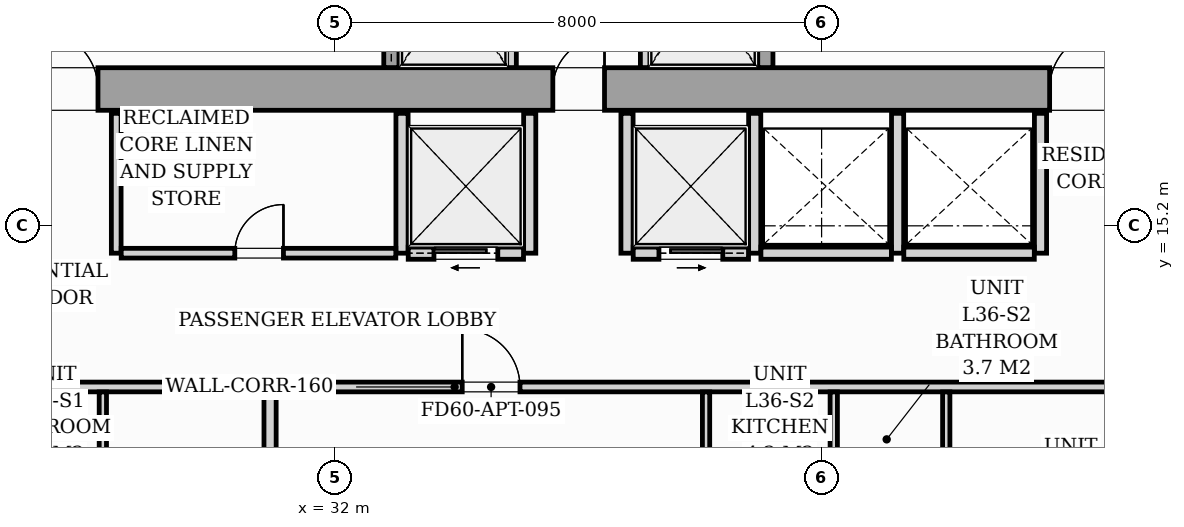
"""IFC4 building model, lengths in metres.
Left out: names, types, materials, properties, quantities, classifications, styles, units other than length and angle.
Written with IfcOpenShell. Run it as: python <this file> out.ifc"""

import sys

from ifc_helpers import new_model, si_unit, direction, frame, frame_2d, origin, origin_2d, place, context, subcontext, project, spatial, rectangle, i_section, extrude, source, transform, mapped, element, fill, save


model = new_model("IFC4")
c1 = context("Model", 3, precision=1e-05, world=origin(), true_north=direction((0.0, 1.0)))
c2 = subcontext(c1, "Body", "Model", "MODEL_VIEW")
j1 = project(units=[si_unit("LENGTHUNIT", "METRE"), si_unit("PLANEANGLEUNIT", "RADIAN")], contexts=[c1])
p1 = place(None, origin())
s1 = spatial("IfcSite", under=j1, at=p1, CompositionType="ELEMENT")
p2 = place(p1, origin())
s2 = spatial("IfcBuilding", under=s1, at=p2, CompositionType="ELEMENT")
p3 = place(p2, frame((0.0, 0.0, 127.8)))
s3 = spatial("IfcBuildingStorey", under=s2, at=p3, CompositionType="ELEMENT", Elevation=127.8)
m1 = source(origin(), c2, "Body", "SweptSolid", [
    extrude(i_section(OverallWidth=0.421, OverallDepth=0.465, WebThickness=0.045, FlangeThickness=0.073, FilletRadius=0.018, at=origin_2d()), origin(), (0.0, 0.0, 1.0), 3.196),
])
for number, where, z_axis, x_axis in (
    (1, (33.12, 17.4, 0.002), (0.0, 0.0, 1.0), (1.0, 0.0, 0.0)),
    (2, (38.88, 17.4, 0.002), (0.0, 0.0, 1.0), (1.0, 0.0, 0.0)),
):
    element("IfcColumn", number, at=place(p3, frame(where, z_axis=z_axis, x_axis=x_axis)), inside=s3, PredefinedType="PILASTER", context=c2, shape_type="MappedRepresentation", body=[
        mapped(m1, transform((0.0, 0.0, 0.0), scale=1.0)),
    ])
p4 = place(p3, frame((26.1, 17.45, 0.0), z_axis=(0.0, 0.0, 1.0), x_axis=(1.0, 0.0, 0.0)))
e3 = element("IfcWall", 3, at=p4, inside=s3, PredefinedType="SHEAR", context=c2, shape_type="SweptSolid", body=[
    extrude(rectangle(XDim=19.8, YDim=0.7, at=frame_2d((9.9, 0.0))), origin(), (0.0, 0.0, 1.0), 3.2),
])
p5 = place(p4, frame((1.05, 0.0, 0.0)))
e4 = element("IfcOpeningElement", 4, at=p5, cuts=e3, PredefinedType="OPENING", context=c2, shape_type="SweptSolid", body=[
    extrude(rectangle(XDim=0.95, YDim=2.06, at=frame_2d((0.475, 1.03))), frame((0.0, 0.36, 0.0), z_axis=(0.0, -1.0, 0.0), x_axis=(1.0, 0.0, 0.0)), (0.0, 0.0, 1.0), 0.72),
])
p6 = place(p4, frame((9.48, 0.0, 0.0)))
e5 = element("IfcOpeningElement", 5, at=p6, cuts=e3, PredefinedType="OPENING", context=c2, shape_type="SweptSolid", body=[
    extrude(rectangle(XDim=0.85, YDim=2.0, at=frame_2d((0.425, 1.0))), frame((0.0, 0.36, 0.0), z_axis=(0.0, -1.0, 0.0), x_axis=(1.0, 0.0, 0.0)), (0.0, 0.0, 1.0), 0.72),
])
p7 = place(p4, frame((17.65, 0.0, 0.0)))
e6 = element("IfcOpeningElement", 6, at=p7, cuts=e3, PredefinedType="OPENING", context=c2, shape_type="SweptSolid", body=[
    extrude(rectangle(XDim=0.95, YDim=2.06, at=frame_2d((0.475, 1.03))), frame((0.0, 0.36, 0.0), z_axis=(0.0, -1.0, 0.0), x_axis=(1.0, 0.0, 0.0)), (0.0, 0.0, 1.0), 0.72),
])
p8 = place(p3, frame((32.925, 17.802, 0.0), z_axis=(0.0, 0.0, 1.0), x_axis=(0.0, 1.0, 0.0)))
e7 = element("IfcWall", 7, at=p8, inside=s3, PredefinedType="SOLIDWALL", context=c2, shape_type="SweptSolid", body=[
    extrude(rectangle(XDim=2.646, YDim=0.25, at=frame_2d((1.323, 0.0))), origin(), (0.0, 0.0, 1.0), 3.2),
])
p9 = place(p8, frame((0.598, 0.0, 0.0)))
e8 = element("IfcOpeningElement", 8, at=p9, cuts=e7, PredefinedType="OPENING", context=c2, shape_type="SweptSolid", body=[
    extrude(rectangle(XDim=1.1, YDim=2.08, at=frame_2d((0.55, 1.04))), frame((0.0, 0.135, 0.0), z_axis=(0.0, -1.0, 0.0), x_axis=(1.0, 0.0, 0.0)), (0.0, 0.0, 1.0), 0.27),
])
for number, where, z_axis, x_axis in (
    (9, (34.9, 17.802, 0.0), (0.0, 0.0, 1.0), (0.0, 1.0, 0.0)),
    (10, (37.1, 17.802, 0.0), (0.0, 0.0, 1.0), (0.0, 1.0, 0.0)),
):
    element("IfcWall", number, at=place(p3, frame(where, z_axis=z_axis, x_axis=x_axis)), inside=s3, PredefinedType="PARTITIONING", context=c2, shape_type="SweptSolid", body=[
        extrude(rectangle(XDim=2.646, YDim=0.16, at=frame_2d((1.323, 0.0))), origin(), (0.0, 0.0, 1.0), 2.94),
    ])
p10 = place(p3, frame((39.075, 17.802, 0.0), z_axis=(0.0, 0.0, 1.0), x_axis=(0.0, 1.0, 0.0)))
e11 = element("IfcWall", 11, at=p10, inside=s3, PredefinedType="SOLIDWALL", context=c2, shape_type="SweptSolid", body=[
    extrude(rectangle(XDim=2.646, YDim=0.25, at=frame_2d((1.323, 0.0))), origin(), (0.0, 0.0, 1.0), 3.2),
])
p11 = place(p10, frame((0.598, 0.0, 0.0)))
e12 = element("IfcOpeningElement", 12, at=p11, cuts=e11, PredefinedType="OPENING", context=c2, shape_type="SweptSolid", body=[
    extrude(rectangle(XDim=1.1, YDim=2.08, at=frame_2d((0.55, 1.04))), frame((0.0, 0.135, 0.0), z_axis=(0.0, -1.0, 0.0), x_axis=(1.0, 0.0, 0.0)), (0.0, 0.0, 1.0), 0.27),
])
p12 = place(p3, frame((28.4, 14.75, 0.0), z_axis=(0.0, 0.0, 1.0), x_axis=(0.0, 1.0, 0.0)))
e13 = element("IfcWall", 13, at=p12, inside=s3, PredefinedType="PARTITIONING", context=c2, shape_type="SweptSolid", body=[
    extrude(rectangle(XDim=2.3, YDim=0.16, at=frame_2d((1.15, 0.0))), origin(), (0.0, 0.0, 1.0), 2.94),
])
p13 = place(p3, frame((33.1, 14.75, 0.0), z_axis=(0.0, 0.0, 1.0), x_axis=(0.0, 1.0, 0.0)))
e14 = element("IfcWall", 14, at=p13, inside=s3, PredefinedType="PARTITIONING", context=c2, shape_type="SweptSolid", body=[
    extrude(rectangle(XDim=2.3, YDim=0.2, at=frame_2d((1.15, 0.0))), origin(), (0.0, 0.0, 1.0), 2.94),
])
p14 = place(p3, frame((28.482, 14.75, 0.0), z_axis=(0.0, 0.0, 1.0), x_axis=(1.0, 0.0, 0.0)))
e15 = element("IfcWall", 15, at=p14, inside=s3, PredefinedType="PARTITIONING", context=c2, shape_type="SweptSolid", body=[
    extrude(rectangle(XDim=4.516, YDim=0.16, at=frame_2d((2.258, 0.0))), origin(), (0.0, 0.0, 1.0), 2.94),
])
p15 = place(p14, frame((1.868, 0.0, 0.0)))
e16 = element("IfcOpeningElement", 16, at=p15, cuts=e15, PredefinedType="OPENING", context=c2, shape_type="SweptSolid", body=[
    extrude(rectangle(XDim=0.8, YDim=2.05, at=frame_2d((0.4, 1.025))), frame((0.0, 0.09, 0.0), z_axis=(0.0, -1.0, 0.0), x_axis=(1.0, 0.0, 0.0)), (0.0, 0.0, 1.0), 0.18),
])
p16 = place(p3, frame((35.2, 14.75, 0.0), z_axis=(0.0, 0.0, 1.0), x_axis=(0.0, 1.0, 0.0)))
e17 = element("IfcWall", 17, at=p16, inside=s3, PredefinedType="PARTITIONING", context=c2, shape_type="SweptSolid", body=[
    extrude(rectangle(XDim=2.3, YDim=0.2, at=frame_2d((1.15, 0.0))), origin(), (0.0, 0.0, 1.0), 2.94),
])
p17 = place(p3, frame((33.202, 14.75, 0.0), z_axis=(0.0, 0.0, 1.0), x_axis=(1.0, 0.0, 0.0)))
e18 = element("IfcWall", 18, at=p17, inside=s3, PredefinedType="PARTITIONING", context=c2, shape_type="SweptSolid", body=[
    extrude(rectangle(XDim=1.896, YDim=0.2, at=frame_2d((0.948, 0.0))), origin(), (0.0, 0.0, 1.0), 2.94),
])
p18 = place(p17, frame((0.423, 0.0, 0.0)))
e19 = element("IfcOpeningElement", 19, at=p18, cuts=e18, PredefinedType="OPENING", context=c2, shape_type="SweptSolid", body=[
    extrude(rectangle(XDim=1.05, YDim=2.08, at=frame_2d((0.525, 1.04))), frame((0.0, 0.11, 0.0), z_axis=(0.0, -1.0, 0.0), x_axis=(1.0, 0.0, 0.0)), (0.0, 0.0, 1.0), 0.22),
])
for number, where, z_axis, x_axis in (
    (20, (36.8, 14.75, 0.0), (0.0, 0.0, 1.0), (0.0, 1.0, 0.0)),
    (21, (38.9, 14.75, 0.0), (0.0, 0.0, 1.0), (0.0, 1.0, 0.0)),
):
    element("IfcWall", number, at=place(p3, frame(where, z_axis=z_axis, x_axis=x_axis)), inside=s3, PredefinedType="PARTITIONING", context=c2, shape_type="SweptSolid", body=[
        extrude(rectangle(XDim=2.3, YDim=0.2, at=frame_2d((1.15, 0.0))), origin(), (0.0, 0.0, 1.0), 2.94),
    ])
p19 = place(p3, frame((36.902, 14.75, 0.0), z_axis=(0.0, 0.0, 1.0), x_axis=(1.0, 0.0, 0.0)))
e22 = element("IfcWall", 22, at=p19, inside=s3, PredefinedType="PARTITIONING", context=c2, shape_type="SweptSolid", body=[
    extrude(rectangle(XDim=1.896, YDim=0.2, at=frame_2d((0.948, 0.0))), origin(), (0.0, 0.0, 1.0), 2.94),
])
p20 = place(p19, frame((0.423, 0.0, 0.0)))
e23 = element("IfcOpeningElement", 23, at=p20, cuts=e22, PredefinedType="OPENING", context=c2, shape_type="SweptSolid", body=[
    extrude(rectangle(XDim=1.05, YDim=2.08, at=frame_2d((0.525, 1.04))), frame((0.0, 0.11, 0.0), z_axis=(0.0, -1.0, 0.0), x_axis=(1.0, 0.0, 0.0)), (0.0, 0.0, 1.0), 0.22),
])
for number, where, z_axis, x_axis in (
    (24, (41.25, 14.75, 0.0), (0.0, 0.0, 1.0), (0.0, 1.0, 0.0)),
    (25, (43.6, 14.75, 0.0), (0.0, 0.0, 1.0), (0.0, 1.0, 0.0)),
):
    element("IfcWall", number, at=place(p3, frame(where, z_axis=z_axis, x_axis=x_axis)), inside=s3, PredefinedType="PARTITIONING", context=c2, shape_type="SweptSolid", body=[
        extrude(rectangle(XDim=2.3, YDim=0.2, at=frame_2d((1.15, 0.0))), origin(), (0.0, 0.0, 1.0), 2.94),
    ])
for number, where, z_axis, x_axis in (
    (26, (39.002, 14.75, 0.0), (0.0, 0.0, 1.0), (1.0, 0.0, 0.0)),
    (27, (41.352, 14.75, 0.0), (0.0, 0.0, 1.0), (1.0, 0.0, 0.0)),
):
    element("IfcWall", number, at=place(p3, frame(where, z_axis=z_axis, x_axis=x_axis)), inside=s3, PredefinedType="PARTITIONING", context=c2, shape_type="SweptSolid", body=[
        extrude(rectangle(XDim=2.146, YDim=0.2, at=frame_2d((1.073, 0.0))), origin(), (0.0, 0.0, 1.0), 2.94),
    ])
p21 = place(p3, frame((22.05, 12.55, 0.0), z_axis=(0.0, 0.0, 1.0), x_axis=(1.0, 0.0, 0.0)))
e28 = element("IfcWall", 28, at=p21, inside=s3, PredefinedType="PARTITIONING", context=c2, shape_type="SweptSolid", body=[
    extrude(rectangle(XDim=23.83, YDim=0.16, at=frame_2d((11.915, 0.0))), origin(), (0.0, 0.0, 1.0), 2.94),
])
p22 = place(p21, frame((0.655, 0.0, 0.0)))
e29 = element("IfcOpeningElement", 29, at=p22, cuts=e28, PredefinedType="OPENING", context=c2, shape_type="SweptSolid", body=[
    extrude(rectangle(XDim=0.95, YDim=2.06, at=frame_2d((0.475, 1.03))), frame((0.0, 0.09, 0.0), z_axis=(0.0, -1.0, 0.0), x_axis=(1.0, 0.0, 0.0)), (0.0, 0.0, 1.0), 0.18),
])
p23 = place(p21, frame((12.04, 0.0, 0.0)))
e30 = element("IfcOpeningElement", 30, at=p23, cuts=e28, PredefinedType="OPENING", context=c2, shape_type="SweptSolid", body=[
    extrude(rectangle(XDim=0.95, YDim=2.06, at=frame_2d((0.475, 1.03))), frame((0.0, 0.09, 0.0), z_axis=(0.0, -1.0, 0.0), x_axis=(1.0, 0.0, 0.0)), (0.0, 0.0, 1.0), 0.18),
])
p24 = place(p3, frame((28.18, 7.48, 0.0), z_axis=(0.0, 0.0, 1.0), x_axis=(0.0, 1.0, 0.0)))
e31 = element("IfcWall", 31, at=p24, inside=s3, PredefinedType="PARTITIONING", context=c2, shape_type="SweptSolid", body=[
    extrude(rectangle(XDim=4.988, YDim=0.12, at=frame_2d((2.494, 0.0))), origin(), (0.0, 0.0, 1.0), 2.94),
])
p25 = place(p24, frame((1.835, 0.0, 0.0)))
e32 = element("IfcOpeningElement", 32, at=p25, cuts=e31, PredefinedType="OPENING", context=c2, shape_type="SweptSolid", body=[
    extrude(rectangle(XDim=0.9, YDim=2.05, at=frame_2d((0.45, 1.025))), frame((0.0, 0.07, 0.0), z_axis=(0.0, -1.0, 0.0), x_axis=(1.0, 0.0, 0.0)), (0.0, 0.0, 1.0), 0.14),
])
p26 = place(p3, frame((30.93, 10.401, 0.0), z_axis=(0.0, 0.0, 1.0), x_axis=(0.0, 1.0, 0.0)))
e33 = element("IfcWall", 33, at=p26, inside=s3, PredefinedType="PARTITIONING", context=c2, shape_type="SweptSolid", body=[
    extrude(rectangle(XDim=2.067, YDim=0.2, at=frame_2d((1.034, 0.0))), origin(), (0.0, 0.0, 1.0), 2.94),
])
p27 = place(p3, frame((42.05, 6.327, 0.0), z_axis=(0.0, 0.0, 1.0), x_axis=(0.0, 1.0, 0.0)))
e34 = element("IfcWall", 34, at=p27, inside=s3, PredefinedType="PARTITIONING", context=c2, shape_type="SweptSolid", body=[
    extrude(rectangle(XDim=6.141, YDim=0.12, at=frame_2d((3.07, 0.0))), origin(), (0.0, 0.0, 1.0), 2.94),
])
p28 = place(p27, frame((2.873, 0.0, 0.0)))
e35 = element("IfcOpeningElement", 35, at=p28, cuts=e34, PredefinedType="OPENING", context=c2, shape_type="SweptSolid", body=[
    extrude(rectangle(XDim=0.9, YDim=2.05, at=frame_2d((0.45, 1.025))), frame((0.0, 0.07, 0.0), z_axis=(0.0, -1.0, 0.0), x_axis=(1.0, 0.0, 0.0)), (0.0, 0.0, 1.0), 0.14),
])
for number, where, z_axis, x_axis in (
    (36, (40.2, 10.362, 0.0), (0.0, 0.0, 1.0), (0.0, 1.0, 0.0)),
    (37, (38.1, 10.362, 0.0), (0.0, 0.0, 1.0), (0.0, 1.0, 0.0)),
):
    element("IfcWall", number, at=place(p3, frame(where, z_axis=z_axis, x_axis=x_axis)), inside=s3, PredefinedType="PARTITIONING", context=c2, shape_type="SweptSolid", body=[
        extrude(rectangle(XDim=2.106, YDim=0.12, at=frame_2d((1.053, 0.0))), origin(), (0.0, 0.0, 1.0), 2.94),
    ])
m2 = source(origin(), c2, "Body", "SweptSolid", [
    extrude(rectangle(XDim=0.95, YDim=2.06, at=frame_2d((0.475, 1.03))), frame((0.0, 0.025, 0.0), z_axis=(0.0, -1.0, 0.0), x_axis=(1.0, 0.0, 0.0)), (0.0, 0.0, 1.0), 0.05),
])
p29 = place(p5, origin())
e38 = element("IfcDoor", 38, at=p29, inside=s3, OperationType="SINGLE_SWING_LEFT", PredefinedType="DOOR", context=c2, shape_type="MappedRepresentation", body=[
    mapped(m2, transform((0.0, 0.0, 0.0), scale=1.0)),
])
fill(e4, e38)
m3 = source(origin(), c2, "Body", "SweptSolid", [
    extrude(rectangle(XDim=0.85, YDim=2.0, at=frame_2d((0.425, 1.0))), frame((0.0, 0.025, 0.0), z_axis=(0.0, -1.0, 0.0), x_axis=(1.0, 0.0, 0.0)), (0.0, 0.0, 1.0), 0.05),
])
p30 = place(p6, origin())
e39 = element("IfcDoor", 39, at=p30, inside=s3, OperationType="SINGLE_SWING_RIGHT", PredefinedType="DOOR", context=c2, shape_type="MappedRepresentation", body=[
    mapped(m3, transform((0.0, 0.0, 0.0), scale=1.0)),
])
fill(e5, e39)
p31 = place(p7, origin())
e40 = element("IfcDoor", 40, at=p31, inside=s3, OperationType="SINGLE_SWING_RIGHT", PredefinedType="DOOR", context=c2, shape_type="MappedRepresentation", body=[
    mapped(m2, transform((0.0, 0.0, 0.0), scale=1.0)),
])
fill(e6, e40)
m4 = source(origin(), c2, "Body", "SweptSolid", [
    extrude(rectangle(XDim=0.8, YDim=2.05, at=frame_2d((0.4, 1.025))), frame((0.0, 0.025, 0.0), z_axis=(0.0, -1.0, 0.0), x_axis=(1.0, 0.0, 0.0)), (0.0, 0.0, 1.0), 0.05),
])
p32 = place(p15, origin())
e41 = element("IfcDoor", 41, at=p32, inside=s3, OperationType="SINGLE_SWING_RIGHT", PredefinedType="DOOR", context=c2, shape_type="MappedRepresentation", body=[
    mapped(m4, transform((0.0, 0.0, 0.0), scale=1.0)),
])
fill(e16, e41)
m5 = source(origin(), c2, "Body", "SweptSolid", [
    extrude(rectangle(XDim=1.05, YDim=2.08, at=frame_2d((0.525, 1.04))), frame((0.0, 0.025, 0.0), z_axis=(0.0, -1.0, 0.0), x_axis=(1.0, 0.0, 0.0)), (0.0, 0.0, 1.0), 0.05),
])
p33 = place(p18, origin())
e42 = element("IfcDoor", 42, at=p33, inside=s3, OperationType="SLIDING_TO_LEFT", PredefinedType="DOOR", context=c2, shape_type="MappedRepresentation", body=[
    mapped(m5, transform((0.0, 0.0, 0.0), scale=1.0)),
])
fill(e19, e42)
p34 = place(p20, origin())
e43 = element("IfcDoor", 43, at=p34, inside=s3, OperationType="SLIDING_TO_RIGHT", PredefinedType="DOOR", context=c2, shape_type="MappedRepresentation", body=[
    mapped(m5, transform((0.0, 0.0, 0.0), scale=1.0)),
])
fill(e23, e43)
m6 = source(origin(), c2, "Body", "SweptSolid", [
    extrude(rectangle(XDim=0.95, YDim=2.06, at=frame_2d((0.475, 1.03))), frame((0.0, 0.025, 0.0), z_axis=(0.0, -1.0, 0.0), x_axis=(1.0, 0.0, 0.0)), (0.0, 0.0, 1.0), 0.05),
])
p35 = place(p23, origin())
e44 = element("IfcDoor", 44, at=p35, inside=s3, OperationType="SINGLE_SWING_LEFT", PredefinedType="DOOR", context=c2, shape_type="MappedRepresentation", body=[
    mapped(m6, transform((0.0, 0.0, 0.0), scale=1.0)),
])
fill(e30, e44)
save(model, sys.argv[1])
